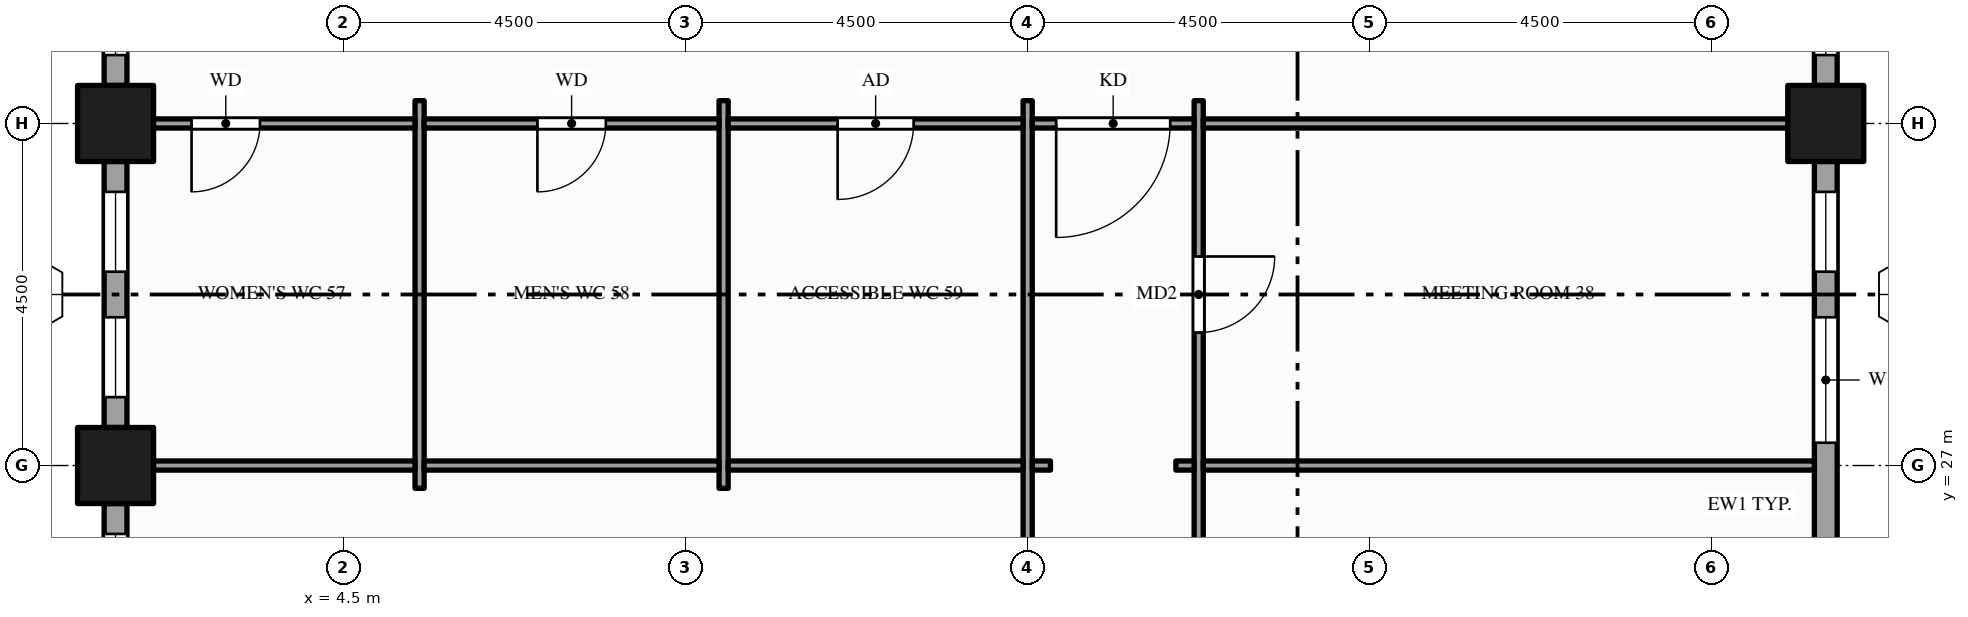
"""IFC4 building model, lengths in metres.
Left out: names, types, materials, properties, quantities, classifications, styles, units other than length and angle.
Written with IfcOpenShell. Run it as: python <this file> out.ifc"""

import sys

from ifc_helpers import new_model, si_unit, direction, frame, frame_2d, origin, origin_2d, place, context, subcontext, project, spatial, rectangle, hollow_rectangle, extrude, element, fill, save


model = new_model("IFC4")
c1 = context("Model", 3, precision=1e-05, world=origin(), true_north=direction((0.0, 1.0)))
c2 = subcontext(c1, "Body", "Model", "MODEL_VIEW")
j1 = project(units=[si_unit("LENGTHUNIT", "METRE"), si_unit("PLANEANGLEUNIT", "RADIAN")], contexts=[c1])
p1 = place(None, origin())
s1 = spatial("IfcSite", under=j1, at=p1, CompositionType="ELEMENT")
p2 = place(p1, origin())
s2 = spatial("IfcBuilding", under=s1, at=p2, CompositionType="ELEMENT")
p3 = place(p2, frame((0.0, 0.0, 115.0)))
s3 = spatial("IfcBuildingStorey", under=s2, at=p3, CompositionType="ELEMENT", Elevation=115.0)
for number, where, z_axis, x_axis in (
    (1, (1.5, 27.0, -0.15), (0.0, 0.0, 1.0), (1.0, 0.0, 0.0)),
    (2, (1.5, 31.5, -0.15), (0.0, 0.0, 1.0), (1.0, 0.0, 0.0)),
    (3, (24.0, 31.5, -0.15), (0.0, 0.0, 1.0), (1.0, 0.0, 0.0)),
):
    element("IfcColumn", number, at=place(p3, frame(where, z_axis=z_axis, x_axis=x_axis)), inside=s3, PredefinedType="COLUMN", context=c2, shape_type="SweptSolid", body=[
        extrude(hollow_rectangle(XDim=1.0, YDim=1.0, WallThickness=0.05, at=origin_2d()), origin(), (0.0, 0.0, 1.0), 4.0),
    ])
p4 = place(p3, frame((24.0, 26.0, 0.0), z_axis=(0.0, 0.0, 1.0), x_axis=(0.0, 1.0, 0.0)))
e4 = element("IfcWall", 4, at=p4, inside=s3, PredefinedType="STANDARD", context=c2, shape_type="SweptSolid", body=[
    extrude(rectangle(XDim=5.0, YDim=0.3, at=frame_2d((2.5, 0.0))), origin(), (0.0, 0.0, 1.0), 3.154),
])
p5 = place(p4, frame((1.3, 0.0, 0.9)))
e5 = element("IfcOpeningElement", 5, at=p5, cuts=e4, PredefinedType="OPENING", context=c2, shape_type="SweptSolid", body=[
    extrude(rectangle(XDim=1.65, YDim=2.0, at=frame_2d((0.825, 1.0))), frame((0.0, 0.16, 0.0), z_axis=(0.0, -1.0, 0.0), x_axis=(1.0, 0.0, 0.0)), (0.0, 0.0, 1.0), 0.32),
])
p6 = place(p4, frame((3.55, 0.0, 0.9)))
e6 = element("IfcOpeningElement", 6, at=p6, cuts=e4, PredefinedType="OPENING", context=c2, shape_type="SweptSolid", body=[
    extrude(rectangle(XDim=1.05, YDim=2.0, at=frame_2d((0.525, 1.0))), frame((0.0, 0.16, 0.0), z_axis=(0.0, -1.0, 0.0), x_axis=(1.0, 0.0, 0.0)), (0.0, 0.0, 1.0), 0.32),
])
p7 = place(p3, frame((24.0, 32.0, 0.0), z_axis=(0.0, 0.0, 1.0), x_axis=(0.0, 1.0, 0.0)))
e7 = element("IfcWall", 7, at=p7, inside=s3, PredefinedType="STANDARD", context=c2, shape_type="SweptSolid", body=[
    extrude(rectangle(XDim=3.5, YDim=0.3, at=frame_2d((1.75, 0.0))), origin(), (0.0, 0.0, 1.0), 3.154),
])
p8 = place(p7, frame((0.4, 0.0, 0.9)))
e8 = element("IfcOpeningElement", 8, at=p8, cuts=e7, PredefinedType="OPENING", context=c2, shape_type="SweptSolid", body=[
    extrude(rectangle(XDim=1.05, YDim=2.0, at=frame_2d((0.525, 1.0))), frame((0.0, 0.16, 0.0), z_axis=(0.0, -1.0, 0.0), x_axis=(1.0, 0.0, 0.0)), (0.0, 0.0, 1.0), 0.32),
])
p9 = place(p7, frame((2.05, 0.0, 0.9)))
e9 = element("IfcOpeningElement", 9, at=p9, cuts=e7, PredefinedType="OPENING", context=c2, shape_type="SweptSolid", body=[
    extrude(rectangle(XDim=1.05, YDim=2.0, at=frame_2d((0.525, 1.0))), frame((0.0, 0.16, 0.0), z_axis=(0.0, -1.0, 0.0), x_axis=(1.0, 0.0, 0.0)), (0.0, 0.0, 1.0), 0.32),
])
p10 = place(p3, frame((1.5, 36.0, 0.0), z_axis=(0.0, 0.0, 1.0), x_axis=(0.0, -1.0, 0.0)))
e10 = element("IfcWall", 10, at=p10, inside=s3, PredefinedType="STANDARD", context=c2, shape_type="SweptSolid", body=[
    extrude(rectangle(XDim=4.0, YDim=0.3, at=frame_2d((2.0, 0.0))), origin(), (0.0, 0.0, 1.0), 3.154),
])
p11 = place(p10, frame((0.4, 0.0, 0.9)))
e11 = element("IfcOpeningElement", 11, at=p11, cuts=e10, PredefinedType="OPENING", context=c2, shape_type="SweptSolid", body=[
    extrude(rectangle(XDim=1.55, YDim=2.0, at=frame_2d((0.775, 1.0))), frame((0.0, 0.16, 0.0), z_axis=(0.0, -1.0, 0.0), x_axis=(1.0, 0.0, 0.0)), (0.0, 0.0, 1.0), 0.32),
])
p12 = place(p10, frame((2.55, 0.0, 0.9)))
e12 = element("IfcOpeningElement", 12, at=p12, cuts=e10, PredefinedType="OPENING", context=c2, shape_type="SweptSolid", body=[
    extrude(rectangle(XDim=1.05, YDim=2.0, at=frame_2d((0.525, 1.0))), frame((0.0, 0.16, 0.0), z_axis=(0.0, -1.0, 0.0), x_axis=(1.0, 0.0, 0.0)), (0.0, 0.0, 1.0), 0.32),
])
p13 = place(p3, frame((1.5, 31.0, 0.0), z_axis=(0.0, 0.0, 1.0), x_axis=(0.0, -1.0, 0.0)))
e13 = element("IfcWall", 13, at=p13, inside=s3, PredefinedType="STANDARD", context=c2, shape_type="SweptSolid", body=[
    extrude(rectangle(XDim=3.5, YDim=0.3, at=frame_2d((1.75, 0.0))), origin(), (0.0, 0.0, 1.0), 3.154),
])
p14 = place(p13, frame((0.4, 0.0, 0.9)))
e14 = element("IfcOpeningElement", 14, at=p14, cuts=e13, PredefinedType="OPENING", context=c2, shape_type="SweptSolid", body=[
    extrude(rectangle(XDim=1.05, YDim=2.0, at=frame_2d((0.525, 1.0))), frame((0.0, 0.16, 0.0), z_axis=(0.0, -1.0, 0.0), x_axis=(1.0, 0.0, 0.0)), (0.0, 0.0, 1.0), 0.32),
])
p15 = place(p13, frame((2.05, 0.0, 0.9)))
e15 = element("IfcOpeningElement", 15, at=p15, cuts=e13, PredefinedType="OPENING", context=c2, shape_type="SweptSolid", body=[
    extrude(rectangle(XDim=1.05, YDim=2.0, at=frame_2d((0.525, 1.0))), frame((0.0, 0.16, 0.0), z_axis=(0.0, -1.0, 0.0), x_axis=(1.0, 0.0, 0.0)), (0.0, 0.0, 1.0), 0.32),
])
p16 = place(p3, frame((1.5, 26.5, 0.0), z_axis=(0.0, 0.0, 1.0), x_axis=(0.0, -1.0, 0.0)))
e16 = element("IfcWall", 16, at=p16, inside=s3, PredefinedType="STANDARD", context=c2, shape_type="SweptSolid", body=[
    extrude(rectangle(XDim=3.5, YDim=0.3, at=frame_2d((1.75, 0.0))), origin(), (0.0, 0.0, 1.0), 3.154),
])
p17 = place(p16, frame((0.4, 0.0, 0.9)))
e17 = element("IfcOpeningElement", 17, at=p17, cuts=e16, PredefinedType="OPENING", context=c2, shape_type="SweptSolid", body=[
    extrude(rectangle(XDim=1.05, YDim=2.0, at=frame_2d((0.525, 1.0))), frame((0.0, 0.16, 0.0), z_axis=(0.0, -1.0, 0.0), x_axis=(1.0, 0.0, 0.0)), (0.0, 0.0, 1.0), 0.32),
])
p18 = place(p16, frame((2.05, 0.0, 0.9)))
e18 = element("IfcOpeningElement", 18, at=p18, cuts=e16, PredefinedType="OPENING", context=c2, shape_type="SweptSolid", body=[
    extrude(rectangle(XDim=1.05, YDim=2.0, at=frame_2d((0.525, 1.0))), frame((0.0, 0.16, 0.0), z_axis=(0.0, -1.0, 0.0), x_axis=(1.0, 0.0, 0.0)), (0.0, 0.0, 1.0), 0.32),
])
for number, where, z_axis, x_axis in (
    (19, (5.5, 26.7, 0.0), (0.0, 0.0, 1.0), (0.0, 1.0, 0.0)),
    (20, (9.5, 26.7, 0.0), (0.0, 0.0, 1.0), (0.0, 1.0, 0.0)),
):
    element("IfcWall", number, at=place(p3, frame(where, z_axis=z_axis, x_axis=x_axis)), inside=s3, PredefinedType="PARTITIONING", context=c2, shape_type="SweptSolid", body=[
        extrude(rectangle(XDim=5.1, YDim=0.12, at=frame_2d((2.55, 0.0))), origin(), (0.0, 0.0, 1.0), 3.85),
    ])
p19 = place(p3, frame((13.5, 10.95, 0.0), z_axis=(0.0, 0.0, 1.0), x_axis=(0.0, 1.0, 0.0)))
e21 = element("IfcWall", 21, at=p19, inside=s3, PredefinedType="PARTITIONING", context=c2, shape_type="SweptSolid", body=[
    extrude(rectangle(XDim=20.85, YDim=0.12, at=frame_2d((10.425, 0.0))), origin(), (0.0, 0.0, 1.0), 2.6),
])
p20 = place(p19, frame((3.175, 0.0, 0.0)))
e22 = element("IfcOpeningElement", 22, at=p20, cuts=e21, PredefinedType="OPENING", context=c2, shape_type="SweptSolid", body=[
    extrude(rectangle(XDim=1.0, YDim=2.1, at=frame_2d((0.5, 1.05))), frame((0.0, 0.07, 0.0), z_axis=(0.0, -1.0, 0.0), x_axis=(1.0, 0.0, 0.0)), (0.0, 0.0, 1.0), 0.14),
])
p21 = place(p19, frame((10.68, 0.0, 0.0)))
e23 = element("IfcOpeningElement", 23, at=p21, cuts=e21, PredefinedType="OPENING", context=c2, shape_type="SweptSolid", body=[
    extrude(rectangle(XDim=1.8, YDim=2.1, at=frame_2d((0.9, 1.05))), frame((0.0, 0.07, 0.0), z_axis=(0.0, -1.0, 0.0), x_axis=(1.0, 0.0, 0.0)), (0.0, 0.0, 1.0), 0.14),
])
p22 = place(p3, frame((15.75, 10.95, 0.0), z_axis=(0.0, 0.0, 1.0), x_axis=(0.0, 1.0, 0.0)))
e24 = element("IfcWall", 24, at=p22, inside=s3, PredefinedType="PARTITIONING", context=c2, shape_type="SweptSolid", body=[
    extrude(rectangle(XDim=20.85, YDim=0.12, at=frame_2d((10.425, 0.0))), origin(), (0.0, 0.0, 1.0), 2.6),
])
p23 = place(p22, frame((17.8, 0.0, 0.0)))
e25 = element("IfcOpeningElement", 25, at=p23, cuts=e24, PredefinedType="OPENING", context=c2, shape_type="SweptSolid", body=[
    extrude(rectangle(XDim=1.0, YDim=2.1, at=frame_2d((0.5, 1.05))), frame((0.0, 0.07, 0.0), z_axis=(0.0, -1.0, 0.0), x_axis=(1.0, 0.0, 0.0)), (0.0, 0.0, 1.0), 0.14),
])
p24 = place(p22, frame((4.2, 0.0, 0.0)))
e26 = element("IfcOpeningElement", 26, at=p24, cuts=e24, PredefinedType="OPENING", context=c2, shape_type="SweptSolid", body=[
    extrude(rectangle(XDim=1.2, YDim=2.1, at=frame_2d((0.6, 1.05))), frame((0.0, 0.07, 0.0), z_axis=(0.0, -1.0, 0.0), x_axis=(1.0, 0.0, 0.0)), (0.0, 0.0, 1.0), 0.14),
])
p25 = place(p3, frame((1.65, 27.0, 0.0), z_axis=(0.0, 0.0, 1.0), x_axis=(1.0, 0.0, 0.0)))
e27 = element("IfcWall", 27, at=p25, inside=s3, PredefinedType="PARTITIONING", context=c2, shape_type="SweptSolid", body=[
    extrude(rectangle(XDim=3.79, YDim=0.12, at=frame_2d((1.895, 0.0))), origin(), (0.0, 0.0, 1.0), 2.938),
])
for number, where, z_axis, x_axis in (
    (28, (5.56, 27.0, 0.0), (0.0, 0.0, 1.0), (1.0, 0.0, 0.0)),
    (29, (9.56, 27.0, 0.0), (0.0, 0.0, 1.0), (1.0, 0.0, 0.0)),
):
    element("IfcWall", number, at=place(p3, frame(where, z_axis=z_axis, x_axis=x_axis)), inside=s3, PredefinedType="PARTITIONING", context=c2, shape_type="SweptSolid", body=[
        extrude(rectangle(XDim=3.88, YDim=0.12, at=frame_2d((1.94, 0.0))), origin(), (0.0, 0.0, 1.0), 2.938),
    ])
for number, where, z_axis, x_axis in (
    (30, (13.56, 27.0, 0.0), (0.0, 0.0, 1.0), (1.0, 0.0, 0.0)),
    (31, (15.45, 27.0, 0.0), (0.0, 0.0, 1.0), (1.0, 0.0, 0.0)),
):
    element("IfcWall", number, at=place(p3, frame(where, z_axis=z_axis, x_axis=x_axis)), inside=s3, PredefinedType="PARTITIONING", context=c2, shape_type="SweptSolid", body=[
        extrude(rectangle(XDim=0.24, YDim=0.12, at=frame_2d((0.12, 0.0))), origin(), (0.0, 0.0, 1.0), 2.938),
    ])
p26 = place(p3, frame((15.81, 27.0, 0.0), z_axis=(0.0, 0.0, 1.0), x_axis=(1.0, 0.0, 0.0)))
e32 = element("IfcWall", 32, at=p26, inside=s3, PredefinedType="PARTITIONING", context=c2, shape_type="SweptSolid", body=[
    extrude(rectangle(XDim=8.04, YDim=0.12, at=frame_2d((4.02, 0.0))), origin(), (0.0, 0.0, 1.0), 2.938),
])
p27 = place(p3, frame((1.65, 31.5, 0.0), z_axis=(0.0, 0.0, 1.0), x_axis=(1.0, 0.0, 0.0)))
e33 = element("IfcWall", 33, at=p27, inside=s3, PredefinedType="PARTITIONING", context=c2, shape_type="SweptSolid", body=[
    extrude(rectangle(XDim=3.79, YDim=0.12, at=frame_2d((1.895, 0.0))), origin(), (0.0, 0.0, 1.0), 2.938),
])
p28 = place(p27, frame((0.85, 0.0, 0.0)))
e34 = element("IfcOpeningElement", 34, at=p28, cuts=e33, PredefinedType="OPENING", context=c2, shape_type="SweptSolid", body=[
    extrude(rectangle(XDim=0.9, YDim=2.1, at=frame_2d((0.45, 1.05))), frame((0.0, 0.07, 0.0), z_axis=(0.0, -1.0, 0.0), x_axis=(1.0, 0.0, 0.0)), (0.0, 0.0, 1.0), 0.14),
])
p29 = place(p3, frame((5.56, 31.5, 0.0), z_axis=(0.0, 0.0, 1.0), x_axis=(1.0, 0.0, 0.0)))
e35 = element("IfcWall", 35, at=p29, inside=s3, PredefinedType="PARTITIONING", context=c2, shape_type="SweptSolid", body=[
    extrude(rectangle(XDim=3.88, YDim=0.12, at=frame_2d((1.94, 0.0))), origin(), (0.0, 0.0, 1.0), 2.938),
])
p30 = place(p29, frame((1.49, 0.0, 0.0)))
e36 = element("IfcOpeningElement", 36, at=p30, cuts=e35, PredefinedType="OPENING", context=c2, shape_type="SweptSolid", body=[
    extrude(rectangle(XDim=0.9, YDim=2.1, at=frame_2d((0.45, 1.05))), frame((0.0, 0.07, 0.0), z_axis=(0.0, -1.0, 0.0), x_axis=(1.0, 0.0, 0.0)), (0.0, 0.0, 1.0), 0.14),
])
p31 = place(p3, frame((9.56, 31.5, 0.0), z_axis=(0.0, 0.0, 1.0), x_axis=(1.0, 0.0, 0.0)))
e37 = element("IfcWall", 37, at=p31, inside=s3, PredefinedType="PARTITIONING", context=c2, shape_type="SweptSolid", body=[
    extrude(rectangle(XDim=3.88, YDim=0.12, at=frame_2d((1.94, 0.0))), origin(), (0.0, 0.0, 1.0), 2.938),
])
p32 = place(p31, frame((1.44, 0.0, 0.0)))
e38 = element("IfcOpeningElement", 38, at=p32, cuts=e37, PredefinedType="OPENING", context=c2, shape_type="SweptSolid", body=[
    extrude(rectangle(XDim=1.0, YDim=2.1, at=frame_2d((0.5, 1.05))), frame((0.0, 0.07, 0.0), z_axis=(0.0, -1.0, 0.0), x_axis=(1.0, 0.0, 0.0)), (0.0, 0.0, 1.0), 0.14),
])
p33 = place(p3, frame((13.56, 31.5, 0.0), z_axis=(0.0, 0.0, 1.0), x_axis=(1.0, 0.0, 0.0)))
e39 = element("IfcWall", 39, at=p33, inside=s3, PredefinedType="PARTITIONING", context=c2, shape_type="SweptSolid", body=[
    extrude(rectangle(XDim=2.13, YDim=0.12, at=frame_2d((1.065, 0.0))), origin(), (0.0, 0.0, 1.0), 2.938),
])
p34 = place(p33, frame((0.315, 0.0, 0.0)))
e40 = element("IfcOpeningElement", 40, at=p34, cuts=e39, PredefinedType="OPENING", context=c2, shape_type="SweptSolid", body=[
    extrude(rectangle(XDim=1.5, YDim=2.1, at=frame_2d((0.75, 1.05))), frame((0.0, 0.07, 0.0), z_axis=(0.0, -1.0, 0.0), x_axis=(1.0, 0.0, 0.0)), (0.0, 0.0, 1.0), 0.14),
])
p35 = place(p3, frame((15.81, 31.5, 0.0), z_axis=(0.0, 0.0, 1.0), x_axis=(1.0, 0.0, 0.0)))
e41 = element("IfcWall", 41, at=p35, inside=s3, PredefinedType="PARTITIONING", context=c2, shape_type="SweptSolid", body=[
    extrude(rectangle(XDim=8.04, YDim=0.12, at=frame_2d((4.02, 0.0))), origin(), (0.0, 0.0, 1.0), 2.938),
])
p36 = place(p5, origin())
e42 = element("IfcWindow", 42, at=p36, inside=s3, PartitioningType="SINGLE_PANEL", PredefinedType="WINDOW", context=c2, shape_type="SweptSolid", body=[
    extrude(rectangle(XDim=1.65, YDim=2.0, at=frame_2d((0.825, 1.0))), frame((0.0, 0.03, 0.0), z_axis=(0.0, -1.0, 0.0), x_axis=(1.0, 0.0, 0.0)), (0.0, 0.0, 1.0), 0.06),
])
fill(e5, e42)
p37 = place(p6, origin())
e43 = element("IfcWindow", 43, at=p37, inside=s3, PartitioningType="SINGLE_PANEL", PredefinedType="WINDOW", context=c2, shape_type="SweptSolid", body=[
    extrude(rectangle(XDim=1.05, YDim=2.0, at=frame_2d((0.525, 1.0))), frame((0.0, 0.03, 0.0), z_axis=(0.0, -1.0, 0.0), x_axis=(1.0, 0.0, 0.0)), (0.0, 0.0, 1.0), 0.06),
])
fill(e6, e43)
p38 = place(p8, origin())
e44 = element("IfcWindow", 44, at=p38, inside=s3, PartitioningType="SINGLE_PANEL", PredefinedType="WINDOW", context=c2, shape_type="SweptSolid", body=[
    extrude(rectangle(XDim=1.05, YDim=2.0, at=frame_2d((0.525, 1.0))), frame((0.0, 0.03, 0.0), z_axis=(0.0, -1.0, 0.0), x_axis=(1.0, 0.0, 0.0)), (0.0, 0.0, 1.0), 0.06),
])
fill(e8, e44)
p39 = place(p12, origin())
e45 = element("IfcWindow", 45, at=p39, inside=s3, PartitioningType="SINGLE_PANEL", PredefinedType="WINDOW", context=c2, shape_type="SweptSolid", body=[
    extrude(rectangle(XDim=1.05, YDim=2.0, at=frame_2d((0.525, 1.0))), frame((0.0, 0.03, 0.0), z_axis=(0.0, -1.0, 0.0), x_axis=(1.0, 0.0, 0.0)), (0.0, 0.0, 1.0), 0.06),
])
fill(e12, e45)
p40 = place(p14, origin())
e46 = element("IfcWindow", 46, at=p40, inside=s3, PartitioningType="SINGLE_PANEL", PredefinedType="WINDOW", context=c2, shape_type="SweptSolid", body=[
    extrude(rectangle(XDim=1.05, YDim=2.0, at=frame_2d((0.525, 1.0))), frame((0.0, 0.03, 0.0), z_axis=(0.0, -1.0, 0.0), x_axis=(1.0, 0.0, 0.0)), (0.0, 0.0, 1.0), 0.06),
])
fill(e14, e46)
p41 = place(p15, origin())
e47 = element("IfcWindow", 47, at=p41, inside=s3, PartitioningType="SINGLE_PANEL", PredefinedType="WINDOW", context=c2, shape_type="SweptSolid", body=[
    extrude(rectangle(XDim=1.05, YDim=2.0, at=frame_2d((0.525, 1.0))), frame((0.0, 0.03, 0.0), z_axis=(0.0, -1.0, 0.0), x_axis=(1.0, 0.0, 0.0)), (0.0, 0.0, 1.0), 0.06),
])
fill(e15, e47)
p42 = place(p17, origin())
e48 = element("IfcWindow", 48, at=p42, inside=s3, PartitioningType="SINGLE_PANEL", PredefinedType="WINDOW", context=c2, shape_type="SweptSolid", body=[
    extrude(rectangle(XDim=1.05, YDim=2.0, at=frame_2d((0.525, 1.0))), frame((0.0, 0.03, 0.0), z_axis=(0.0, -1.0, 0.0), x_axis=(1.0, 0.0, 0.0)), (0.0, 0.0, 1.0), 0.06),
])
fill(e17, e48)
p43 = place(p34, origin())
e49 = element("IfcDoor", 49, at=p43, inside=s3, OperationType="SINGLE_SWING_LEFT", PredefinedType="DOOR", context=c2, shape_type="SweptSolid", body=[
    extrude(rectangle(XDim=1.5, YDim=2.1, at=frame_2d((0.75, 1.05))), frame((0.0, 0.025, 0.0), z_axis=(0.0, -1.0, 0.0), x_axis=(1.0, 0.0, 0.0)), (0.0, 0.0, 1.0), 0.05),
])
fill(e40, e49)
p44 = place(p28, origin())
e50 = element("IfcDoor", 50, at=p44, inside=s3, OperationType="SINGLE_SWING_LEFT", PredefinedType="DOOR", context=c2, shape_type="SweptSolid", body=[
    extrude(rectangle(XDim=0.9, YDim=2.1, at=frame_2d((0.45, 1.05))), frame((0.0, 0.025, 0.0), z_axis=(0.0, -1.0, 0.0), x_axis=(1.0, 0.0, 0.0)), (0.0, 0.0, 1.0), 0.05),
])
fill(e34, e50)
p45 = place(p30, origin())
e51 = element("IfcDoor", 51, at=p45, inside=s3, OperationType="SINGLE_SWING_LEFT", PredefinedType="DOOR", context=c2, shape_type="SweptSolid", body=[
    extrude(rectangle(XDim=0.9, YDim=2.1, at=frame_2d((0.45, 1.05))), frame((0.0, 0.025, 0.0), z_axis=(0.0, -1.0, 0.0), x_axis=(1.0, 0.0, 0.0)), (0.0, 0.0, 1.0), 0.05),
])
fill(e36, e51)
p46 = place(p32, origin())
e52 = element("IfcDoor", 52, at=p46, inside=s3, OperationType="SINGLE_SWING_LEFT", PredefinedType="DOOR", context=c2, shape_type="SweptSolid", body=[
    extrude(rectangle(XDim=1.0, YDim=2.1, at=frame_2d((0.5, 1.05))), frame((0.0, 0.025, 0.0), z_axis=(0.0, -1.0, 0.0), x_axis=(1.0, 0.0, 0.0)), (0.0, 0.0, 1.0), 0.05),
])
fill(e38, e52)
p47 = place(p23, origin())
e53 = element("IfcDoor", 53, at=p47, inside=s3, OperationType="SINGLE_SWING_RIGHT", PredefinedType="DOOR", context=c2, shape_type="SweptSolid", body=[
    extrude(rectangle(XDim=1.0, YDim=2.1, at=frame_2d((0.5, 1.05))), frame((0.0, 0.025, 0.0), z_axis=(0.0, -1.0, 0.0), x_axis=(1.0, 0.0, 0.0)), (0.0, 0.0, 1.0), 0.05),
])
fill(e25, e53)
save(model, sys.argv[1])
